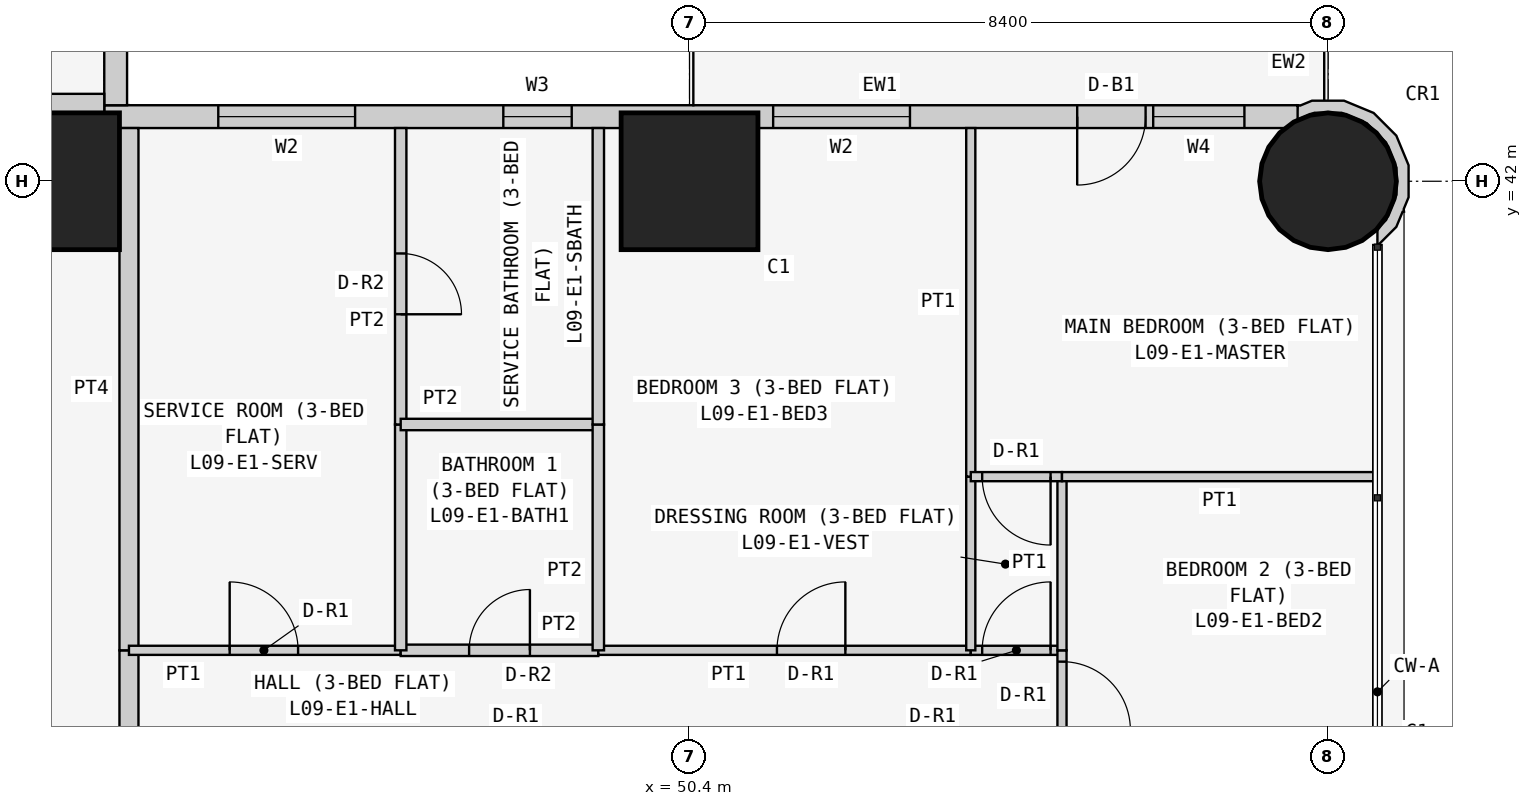
"""IFC4 building model, lengths in metres.
Left out: names, types, materials, properties, quantities, classifications, styles, units other than length and angle.
Written with IfcOpenShell. Run it as: python <this file> out.ifc"""

import sys

from ifc_helpers import new_model, si_unit, direction, frame, frame_2d, origin, origin_2d, place, context, subcontext, project, spatial, polyline, rectangle, circle, outline, extrude, element, fill, save


model = new_model("IFC4")
c1 = context("Model", 3, precision=1e-05, world=origin(), true_north=direction((0.0, 1.0)))
c2 = subcontext(c1, "Body", "Model", "MODEL_VIEW")
j1 = project(units=[si_unit("LENGTHUNIT", "METRE"), si_unit("PLANEANGLEUNIT", "RADIAN")], contexts=[c1])
p1 = place(None, origin())
s1 = spatial("IfcSite", under=j1, at=p1, CompositionType="ELEMENT")
p2 = place(p1, origin())
s2 = spatial("IfcBuilding", under=s1, at=p2, CompositionType="ELEMENT")
p3 = place(p2, frame((0.0, 0.0, 41.7)))
s3 = spatial("IfcBuildingStorey", under=s2, at=p3, CompositionType="ELEMENT", Elevation=41.7)
for number, where, z_axis, x_axis in (
    (1, (42.0, 42.0, 0.0), (0.0, 0.0, 1.0), (1.0, 0.0, 0.0)),
    (2, (50.4, 42.0, 0.0), (0.0, 0.0, 1.0), (1.0, 0.0, 0.0)),
):
    element("IfcColumn", number, at=place(p3, frame(where, z_axis=z_axis, x_axis=x_axis)), inside=s3, PredefinedType="COLUMN", context=c2, shape_type="SweptSolid", body=[
        extrude(rectangle(XDim=1.8, YDim=1.8, at=origin_2d()), origin(), (0.0, 0.0, 1.0), 3.6),
    ])
p4 = place(p3, frame((58.8, 42.0, 0.0), z_axis=(0.0, 0.0, 1.0), x_axis=(1.0, 0.0, 0.0)))
e3 = element("IfcColumn", 3, at=p4, inside=s3, PredefinedType="COLUMN", context=c2, shape_type="SweptSolid", body=[
    extrude(circle(Radius=0.9, at=origin_2d()), origin(), (0.0, 0.0, 1.0), 3.6),
])
p5 = place(p3, frame((58.4, 42.85, 0.0), z_axis=(0.0, 0.0, 1.0), x_axis=(-1.0, 0.0, 0.0)))
e4 = element("IfcWall", 4, at=p5, inside=s3, PredefinedType="SOLIDWALL", context=c2, shape_type="SweptSolid", body=[
    extrude(rectangle(XDim=15.7, YDim=0.3, at=frame_2d((7.85, 0.0))), origin(), (0.0, 0.0, 1.0), 3.45),
])
p6 = place(p5, frame((12.4, 0.0, 0.9)))
e5 = element("IfcOpeningElement", 5, at=p6, cuts=e4, PredefinedType="OPENING", context=c2, shape_type="SweptSolid", body=[
    extrude(rectangle(XDim=1.8, YDim=1.5, at=frame_2d((0.9, 0.75))), frame((0.0, 0.16, 0.0), z_axis=(0.0, -1.0, 0.0), x_axis=(1.0, 0.0, 0.0)), (0.0, 0.0, 1.0), 0.32),
])
p7 = place(p5, frame((9.55, 0.0, 1.5)))
e6 = element("IfcOpeningElement", 6, at=p7, cuts=e4, PredefinedType="OPENING", context=c2, shape_type="SweptSolid", body=[
    extrude(rectangle(XDim=0.9, YDim=0.7, at=frame_2d((0.45, 0.35))), frame((0.0, 0.16, 0.0), z_axis=(0.0, -1.0, 0.0), x_axis=(1.0, 0.0, 0.0)), (0.0, 0.0, 1.0), 0.32),
])
p8 = place(p5, frame((5.1, 0.0, 0.9)))
e7 = element("IfcOpeningElement", 7, at=p8, cuts=e4, PredefinedType="OPENING", context=c2, shape_type="SweptSolid", body=[
    extrude(rectangle(XDim=1.8, YDim=1.5, at=frame_2d((0.9, 0.75))), frame((0.0, 0.16, 0.0), z_axis=(0.0, -1.0, 0.0), x_axis=(1.0, 0.0, 0.0)), (0.0, 0.0, 1.0), 0.32),
])
p9 = place(p5, frame((2.0, 0.0, 0.0)))
e8 = element("IfcOpeningElement", 8, at=p9, cuts=e4, PredefinedType="OPENING", context=c2, shape_type="SweptSolid", body=[
    extrude(rectangle(XDim=0.9, YDim=2.4, at=frame_2d((0.45, 1.2))), frame((0.0, 0.16, 0.0), z_axis=(0.0, -1.0, 0.0), x_axis=(1.0, 0.0, 0.0)), (0.0, 0.0, 1.0), 0.32),
])
p10 = place(p5, frame((0.7, 0.0, 0.9)))
e9 = element("IfcOpeningElement", 9, at=p10, cuts=e4, PredefinedType="OPENING", context=c2, shape_type="SweptSolid", body=[
    extrude(rectangle(XDim=1.2, YDim=1.5, at=frame_2d((0.6, 0.75))), frame((0.0, 0.16, 0.0), z_axis=(0.0, -1.0, 0.0), x_axis=(1.0, 0.0, 0.0)), (0.0, 0.0, 1.0), 0.32),
])
p11 = place(p3, frame((42.85, 43.0, 0.0), z_axis=(0.0, 0.0, 1.0), x_axis=(0.0, 1.0, 0.0)))
e10 = element("IfcWall", 10, at=p11, inside=s3, PredefinedType="SOLIDWALL", context=c2, shape_type="SweptSolid", body=[
    extrude(rectangle(XDim=15.4, YDim=0.3, at=frame_2d((7.7, 0.0))), origin(), (0.0, 0.0, 1.0), 3.45),
])
p12 = place(p11, frame((1.2, 0.0, 0.9)))
e11 = element("IfcOpeningElement", 11, at=p12, cuts=e10, PredefinedType="OPENING", context=c2, shape_type="SweptSolid", body=[
    extrude(rectangle(XDim=1.8, YDim=1.5, at=frame_2d((0.9, 0.75))), frame((0.0, 0.16, 0.0), z_axis=(0.0, -1.0, 0.0), x_axis=(1.0, 0.0, 0.0)), (0.0, 0.0, 1.0), 0.32),
])
p13 = place(p11, frame((4.95, 0.0, 1.5)))
e12 = element("IfcOpeningElement", 12, at=p13, cuts=e10, PredefinedType="OPENING", context=c2, shape_type="SweptSolid", body=[
    extrude(rectangle(XDim=0.9, YDim=0.7, at=frame_2d((0.45, 0.35))), frame((0.0, 0.16, 0.0), z_axis=(0.0, -1.0, 0.0), x_axis=(1.0, 0.0, 0.0)), (0.0, 0.0, 1.0), 0.32),
])
p14 = place(p11, frame((8.5, 0.0, 0.9)))
e13 = element("IfcOpeningElement", 13, at=p14, cuts=e10, PredefinedType="OPENING", context=c2, shape_type="SweptSolid", body=[
    extrude(rectangle(XDim=1.8, YDim=1.5, at=frame_2d((0.9, 0.75))), frame((0.0, 0.16, 0.0), z_axis=(0.0, -1.0, 0.0), x_axis=(1.0, 0.0, 0.0)), (0.0, 0.0, 1.0), 0.32),
])
p15 = place(p11, frame((12.5, 0.0, 0.0)))
e14 = element("IfcOpeningElement", 14, at=p15, cuts=e10, PredefinedType="OPENING", context=c2, shape_type="SweptSolid", body=[
    extrude(rectangle(XDim=0.9, YDim=2.4, at=frame_2d((0.45, 1.2))), frame((0.0, 0.16, 0.0), z_axis=(0.0, -1.0, 0.0), x_axis=(1.0, 0.0, 0.0)), (0.0, 0.0, 1.0), 0.32),
])
p16 = place(p11, frame((13.5, 0.0, 0.9)))
e15 = element("IfcOpeningElement", 15, at=p16, cuts=e10, PredefinedType="OPENING", context=c2, shape_type="SweptSolid", body=[
    extrude(rectangle(XDim=1.2, YDim=1.5, at=frame_2d((0.6, 0.75))), frame((0.0, 0.16, 0.0), z_axis=(0.0, -1.0, 0.0), x_axis=(1.0, 0.0, 0.0)), (0.0, 0.0, 1.0), 0.32),
])
p17 = place(p3, frame((59.411, 41.233, 0.0), z_axis=(0.0, 0.0, 1.0), x_axis=(0.926129809145, 0.377204953059, 0.0)))
e16 = element("IfcWall", 16, at=p17, inside=s3, PredefinedType="SOLIDWALL", context=c2, shape_type="SweptSolid", body=[
    extrude(outline(polyline([(0.626, 0.345), (0.785, 0.736), (0.782, 1.157), (0.619, 1.546), (0.319, 1.843), (-0.072, 2.002), (-0.24, 2.001), (-0.27, 2.017), (-0.37, 1.841), (-0.102, 1.842), (0.23, 1.707), (0.485, 1.455), (0.624, 1.125), (0.626, 0.766), (0.491, 0.434), (0.238, 0.179), (0.09, 0.117), (0.011, -0.078), (0.024, -0.083), (0.329, 0.045), (0.48, 0.198), (0.499, 0.193), (0.508, 0.225), (0.626, 0.345)])), origin(), (0.0, 0.0, 1.0), 3.45),
])
p18 = place(p3, frame((35.829, 43.025, 0.0), z_axis=(0.0, 0.0, 1.0), x_axis=(1.0, 0.0, 0.0)))
e17 = element("IfcWall", 17, at=p18, inside=s3, PredefinedType="PARTITIONING", context=c2, shape_type="SweptSolid", body=[
    extrude(rectangle(XDim=6.871, YDim=0.25, at=frame_2d((3.436, 0.0))), origin(), (0.0, 0.0, 1.0), 3.45),
])
p19 = place(p3, frame((43.025, 35.829, 0.0), z_axis=(0.0, 0.0, 1.0), x_axis=(0.0, -1.0, 0.0)))
e18 = element("IfcWall", 18, at=p19, inside=s3, PredefinedType="PARTITIONING", context=c2, shape_type="SweptSolid", body=[
    extrude(rectangle(XDim=1.2, YDim=0.25, at=frame_2d((0.6, 0.0))), origin(), (0.0, 0.0, 1.0), 3.45),
])
p20 = place(p3, frame((43.025, 42.7, 0.0), z_axis=(0.0, 0.0, 1.0), x_axis=(0.0, -1.0, 0.0)))
e19 = element("IfcWall", 19, at=p20, inside=s3, PredefinedType="PARTITIONING", context=c2, shape_type="SweptSolid", body=[
    extrude(rectangle(XDim=6.871, YDim=0.25, at=frame_2d((3.436, 0.0))), origin(), (0.0, 0.0, 1.0), 3.45),
])
p21 = place(p3, frame((46.6, 35.829, 0.0), z_axis=(0.0, 0.0, 1.0), x_axis=(-1.0, 0.0, 0.0)))
e20 = element("IfcWall", 20, at=p21, inside=s3, PredefinedType="PARTITIONING", context=c2, shape_type="SweptSolid", body=[
    extrude(rectangle(XDim=3.575, YDim=0.12, at=frame_2d((1.788, 0.0))), origin(), (0.0, 0.0, 1.0), 3.45),
])
p22 = place(p21, frame((1.35, 0.0, 0.0)))
e21 = element("IfcOpeningElement", 21, at=p22, cuts=e20, PredefinedType="OPENING", context=c2, shape_type="SweptSolid", body=[
    extrude(rectangle(XDim=0.9, YDim=2.1, at=frame_2d((0.45, 1.05))), frame((0.0, 0.07, 0.0), z_axis=(0.0, -1.0, 0.0), x_axis=(1.0, 0.0, 0.0)), (0.0, 0.0, 1.0), 0.14),
])
p23 = place(p3, frame((49.2, 35.829, 0.0), z_axis=(0.0, 0.0, 1.0), x_axis=(-1.0, 0.0, 0.0)))
e22 = element("IfcWall", 22, at=p23, inside=s3, PredefinedType="PARTITIONING", context=c2, shape_type="SweptSolid", body=[
    extrude(rectangle(XDim=2.6, YDim=0.15, at=frame_2d((1.3, 0.0))), origin(), (0.0, 0.0, 1.0), 3.45),
])
p24 = place(p23, frame((0.9, 0.0, 0.0)))
e23 = element("IfcOpeningElement", 23, at=p24, cuts=e22, PredefinedType="OPENING", context=c2, shape_type="SweptSolid", body=[
    extrude(rectangle(XDim=0.8, YDim=2.1, at=frame_2d((0.4, 1.05))), frame((0.0, 0.085, 0.0), z_axis=(0.0, -1.0, 0.0), x_axis=(1.0, 0.0, 0.0)), (0.0, 0.0, 1.0), 0.17),
])
p25 = place(p3, frame((54.1, 35.829, 0.0), z_axis=(0.0, 0.0, 1.0), x_axis=(-1.0, 0.0, 0.0)))
e24 = element("IfcWall", 24, at=p25, inside=s3, PredefinedType="PARTITIONING", context=c2, shape_type="SweptSolid", body=[
    extrude(rectangle(XDim=4.9, YDim=0.12, at=frame_2d((2.45, 0.0))), origin(), (0.0, 0.0, 1.0), 3.45),
])
p26 = place(p25, frame((1.65, 0.0, 0.0)))
e25 = element("IfcOpeningElement", 25, at=p26, cuts=e24, PredefinedType="OPENING", context=c2, shape_type="SweptSolid", body=[
    extrude(rectangle(XDim=0.9, YDim=2.1, at=frame_2d((0.45, 1.05))), frame((0.0, 0.07, 0.0), z_axis=(0.0, -1.0, 0.0), x_axis=(1.0, 0.0, 0.0)), (0.0, 0.0, 1.0), 0.14),
])
p27 = place(p3, frame((55.3, 35.829, 0.0), z_axis=(0.0, 0.0, 1.0), x_axis=(-1.0, 0.0, 0.0)))
e26 = element("IfcWall", 26, at=p27, inside=s3, PredefinedType="PARTITIONING", context=c2, shape_type="SweptSolid", body=[
    extrude(rectangle(XDim=1.2, YDim=0.12, at=frame_2d((0.6, 0.0))), origin(), (0.0, 0.0, 1.0), 3.45),
])
p28 = place(p27, frame((0.15, 0.0, 0.0)))
e27 = element("IfcOpeningElement", 27, at=p28, cuts=e26, PredefinedType="OPENING", context=c2, shape_type="SweptSolid", body=[
    extrude(rectangle(XDim=0.9, YDim=2.1, at=frame_2d((0.45, 1.05))), frame((0.0, 0.07, 0.0), z_axis=(0.0, -1.0, 0.0), x_axis=(1.0, 0.0, 0.0)), (0.0, 0.0, 1.0), 0.14),
])
p29 = place(p3, frame((55.3, 34.629, 0.0), z_axis=(0.0, 0.0, 1.0), x_axis=(0.0, 1.0, 0.0)))
e28 = element("IfcWall", 28, at=p29, inside=s3, PredefinedType="PARTITIONING", context=c2, shape_type="SweptSolid", body=[
    extrude(rectangle(XDim=1.2, YDim=0.12, at=frame_2d((0.6, 0.0))), origin(), (0.0, 0.0, 1.0), 3.45),
])
p30 = place(p29, frame((0.151, 0.0, 0.0)))
e29 = element("IfcOpeningElement", 29, at=p30, cuts=e28, PredefinedType="OPENING", context=c2, shape_type="SweptSolid", body=[
    extrude(rectangle(XDim=0.9, YDim=2.1, at=frame_2d((0.45, 1.05))), frame((0.0, 0.07, 0.0), z_axis=(0.0, -1.0, 0.0), x_axis=(1.0, 0.0, 0.0)), (0.0, 0.0, 1.0), 0.14),
])
p31 = place(p3, frame((46.6, 35.829, 0.0), z_axis=(0.0, 0.0, 1.0), x_axis=(0.0, 1.0, 0.0)))
e30 = element("IfcWall", 30, at=p31, inside=s3, PredefinedType="PARTITIONING", context=c2, shape_type="SweptSolid", body=[
    extrude(rectangle(XDim=2.971, YDim=0.15, at=frame_2d((1.485, 0.0))), origin(), (0.0, 0.0, 1.0), 3.45),
])
p32 = place(p3, frame((46.6, 38.8, 0.0), z_axis=(0.0, 0.0, 1.0), x_axis=(0.0, 1.0, 0.0)))
e31 = element("IfcWall", 31, at=p32, inside=s3, PredefinedType="PARTITIONING", context=c2, shape_type="SweptSolid", body=[
    extrude(rectangle(XDim=3.9, YDim=0.15, at=frame_2d((1.95, 0.0))), origin(), (0.0, 0.0, 1.0), 3.45),
])
p33 = place(p32, frame((1.45, 0.0, 0.0)))
e32 = element("IfcOpeningElement", 32, at=p33, cuts=e31, PredefinedType="OPENING", context=c2, shape_type="SweptSolid", body=[
    extrude(rectangle(XDim=0.8, YDim=2.1, at=frame_2d((0.4, 1.05))), frame((0.0, 0.085, 0.0), z_axis=(0.0, -1.0, 0.0), x_axis=(1.0, 0.0, 0.0)), (0.0, 0.0, 1.0), 0.17),
])
p34 = place(p3, frame((49.2, 38.8, 0.0), z_axis=(0.0, 0.0, 1.0), x_axis=(-1.0, 0.0, 0.0)))
e33 = element("IfcWall", 33, at=p34, inside=s3, PredefinedType="PARTITIONING", context=c2, shape_type="SweptSolid", body=[
    extrude(rectangle(XDim=2.6, YDim=0.15, at=frame_2d((1.3, 0.0))), origin(), (0.0, 0.0, 1.0), 3.45),
])
p35 = place(p3, frame((49.2, 35.829, 0.0), z_axis=(0.0, 0.0, 1.0), x_axis=(0.0, 1.0, 0.0)))
e34 = element("IfcWall", 34, at=p35, inside=s3, PredefinedType="PARTITIONING", context=c2, shape_type="SweptSolid", body=[
    extrude(rectangle(XDim=2.971, YDim=0.15, at=frame_2d((1.485, 0.0))), origin(), (0.0, 0.0, 1.0), 3.45),
])
p36 = place(p3, frame((49.2, 38.8, 0.0), z_axis=(0.0, 0.0, 1.0), x_axis=(0.0, 1.0, 0.0)))
e35 = element("IfcWall", 35, at=p36, inside=s3, PredefinedType="PARTITIONING", context=c2, shape_type="SweptSolid", body=[
    extrude(rectangle(XDim=3.9, YDim=0.15, at=frame_2d((1.95, 0.0))), origin(), (0.0, 0.0, 1.0), 3.45),
])
p37 = place(p3, frame((54.1, 35.829, 0.0), z_axis=(0.0, 0.0, 1.0), x_axis=(0.0, 1.0, 0.0)))
e36 = element("IfcWall", 36, at=p37, inside=s3, PredefinedType="PARTITIONING", context=c2, shape_type="SweptSolid", body=[
    extrude(rectangle(XDim=2.285, YDim=0.12, at=frame_2d((1.143, 0.0))), origin(), (0.0, 0.0, 1.0), 3.45),
])
p38 = place(p3, frame((54.1, 38.114, 0.0), z_axis=(0.0, 0.0, 1.0), x_axis=(0.0, 1.0, 0.0)))
e37 = element("IfcWall", 37, at=p38, inside=s3, PredefinedType="PARTITIONING", context=c2, shape_type="SweptSolid", body=[
    extrude(rectangle(XDim=4.586, YDim=0.12, at=frame_2d((2.293, 0.0))), origin(), (0.0, 0.0, 1.0), 3.45),
])
p39 = place(p3, frame((55.3, 35.829, 0.0), z_axis=(0.0, 0.0, 1.0), x_axis=(0.0, 1.0, 0.0)))
e38 = element("IfcWall", 38, at=p39, inside=s3, PredefinedType="PARTITIONING", context=c2, shape_type="SweptSolid", body=[
    extrude(rectangle(XDim=2.285, YDim=0.12, at=frame_2d((1.143, 0.0))), origin(), (0.0, 0.0, 1.0), 3.45),
])
p40 = place(p3, frame((55.3, 38.114, 0.0), z_axis=(0.0, 0.0, 1.0), x_axis=(-1.0, 0.0, 0.0)))
e39 = element("IfcWall", 39, at=p40, inside=s3, PredefinedType="PARTITIONING", context=c2, shape_type="SweptSolid", body=[
    extrude(rectangle(XDim=1.2, YDim=0.12, at=frame_2d((0.6, 0.0))), origin(), (0.0, 0.0, 1.0), 3.45),
])
p41 = place(p40, frame((0.15, 0.0, 0.0)))
e40 = element("IfcOpeningElement", 40, at=p41, cuts=e39, PredefinedType="OPENING", context=c2, shape_type="SweptSolid", body=[
    extrude(rectangle(XDim=0.9, YDim=2.1, at=frame_2d((0.45, 1.05))), frame((0.0, 0.07, 0.0), z_axis=(0.0, -1.0, 0.0), x_axis=(1.0, 0.0, 0.0)), (0.0, 0.0, 1.0), 0.14),
])
p42 = place(p3, frame((59.45, 38.114, 0.0), z_axis=(0.0, 0.0, 1.0), x_axis=(-1.0, 0.0, 0.0)))
e41 = element("IfcWall", 41, at=p42, inside=s3, PredefinedType="PARTITIONING", context=c2, shape_type="SweptSolid", body=[
    extrude(rectangle(XDim=4.15, YDim=0.12, at=frame_2d((2.075, 0.0))), origin(), (0.0, 0.0, 1.0), 3.45),
])
p43 = place(p6, origin())
e42 = element("IfcWindow", 42, at=p43, inside=s3, PartitioningType="SINGLE_PANEL", PredefinedType="WINDOW", context=c2, shape_type="SweptSolid", body=[
    extrude(rectangle(XDim=1.8, YDim=1.5, at=frame_2d((0.9, 0.75))), frame((0.0, 0.03, 0.0), z_axis=(0.0, -1.0, 0.0), x_axis=(1.0, 0.0, 0.0)), (0.0, 0.0, 1.0), 0.06),
])
fill(e5, e42)
p44 = place(p7, origin())
e43 = element("IfcWindow", 43, at=p44, inside=s3, PartitioningType="SINGLE_PANEL", PredefinedType="WINDOW", context=c2, shape_type="SweptSolid", body=[
    extrude(rectangle(XDim=0.9, YDim=0.7, at=frame_2d((0.45, 0.35))), frame((0.0, 0.03, 0.0), z_axis=(0.0, -1.0, 0.0), x_axis=(1.0, 0.0, 0.0)), (0.0, 0.0, 1.0), 0.06),
])
fill(e6, e43)
p45 = place(p8, origin())
e44 = element("IfcWindow", 44, at=p45, inside=s3, PartitioningType="SINGLE_PANEL", PredefinedType="WINDOW", context=c2, shape_type="SweptSolid", body=[
    extrude(rectangle(XDim=1.8, YDim=1.5, at=frame_2d((0.9, 0.75))), frame((0.0, 0.03, 0.0), z_axis=(0.0, -1.0, 0.0), x_axis=(1.0, 0.0, 0.0)), (0.0, 0.0, 1.0), 0.06),
])
fill(e7, e44)
p46 = place(p9, origin())
e45 = element("IfcDoor", 45, at=p46, inside=s3, OperationType="SINGLE_SWING_RIGHT", PredefinedType="DOOR", context=c2, shape_type="SweptSolid", body=[
    extrude(rectangle(XDim=0.9, YDim=2.4, at=frame_2d((0.45, 1.2))), frame((0.0, 0.025, 0.0), z_axis=(0.0, -1.0, 0.0), x_axis=(1.0, 0.0, 0.0)), (0.0, 0.0, 1.0), 0.05),
])
fill(e8, e45)
p47 = place(p10, origin())
e46 = element("IfcWindow", 46, at=p47, inside=s3, PartitioningType="SINGLE_PANEL", PredefinedType="WINDOW", context=c2, shape_type="SweptSolid", body=[
    extrude(rectangle(XDim=1.2, YDim=1.5, at=frame_2d((0.6, 0.75))), frame((0.0, 0.03, 0.0), z_axis=(0.0, -1.0, 0.0), x_axis=(1.0, 0.0, 0.0)), (0.0, 0.0, 1.0), 0.06),
])
fill(e9, e46)
p48 = place(p22, frame((0.9, 0.0, 0.0), z_axis=(0.0, 0.0, 1.0), x_axis=(-1.0, 0.0, 0.0)))
e47 = element("IfcDoor", 47, at=p48, inside=s3, OperationType="SINGLE_SWING_LEFT", PredefinedType="DOOR", context=c2, shape_type="SweptSolid", body=[
    extrude(rectangle(XDim=0.9, YDim=2.1, at=frame_2d((0.45, 1.05))), frame((0.0, 0.025, 0.0), z_axis=(0.0, -1.0, 0.0), x_axis=(1.0, 0.0, 0.0)), (0.0, 0.0, 1.0), 0.05),
])
fill(e21, e47)
p49 = place(p33, frame((0.8, 0.0, 0.0), z_axis=(0.0, 0.0, 1.0), x_axis=(-1.0, 0.0, 0.0)))
e48 = element("IfcDoor", 48, at=p49, inside=s3, OperationType="SINGLE_SWING_RIGHT", PredefinedType="DOOR", context=c2, shape_type="SweptSolid", body=[
    extrude(rectangle(XDim=0.8, YDim=2.1, at=frame_2d((0.4, 1.05))), frame((0.0, 0.025, 0.0), z_axis=(0.0, -1.0, 0.0), x_axis=(1.0, 0.0, 0.0)), (0.0, 0.0, 1.0), 0.05),
])
fill(e32, e48)
p50 = place(p24, frame((0.8, 0.0, 0.0), z_axis=(0.0, 0.0, 1.0), x_axis=(-1.0, 0.0, 0.0)))
e49 = element("IfcDoor", 49, at=p50, inside=s3, OperationType="SINGLE_SWING_RIGHT", PredefinedType="DOOR", context=c2, shape_type="SweptSolid", body=[
    extrude(rectangle(XDim=0.8, YDim=2.1, at=frame_2d((0.4, 1.05))), frame((0.0, 0.025, 0.0), z_axis=(0.0, -1.0, 0.0), x_axis=(1.0, 0.0, 0.0)), (0.0, 0.0, 1.0), 0.05),
])
fill(e23, e49)
p51 = place(p26, frame((0.9, 0.0, 0.0), z_axis=(0.0, 0.0, 1.0), x_axis=(-1.0, 0.0, 0.0)))
e50 = element("IfcDoor", 50, at=p51, inside=s3, OperationType="SINGLE_SWING_RIGHT", PredefinedType="DOOR", context=c2, shape_type="SweptSolid", body=[
    extrude(rectangle(XDim=0.9, YDim=2.1, at=frame_2d((0.45, 1.05))), frame((0.0, 0.025, 0.0), z_axis=(0.0, -1.0, 0.0), x_axis=(1.0, 0.0, 0.0)), (0.0, 0.0, 1.0), 0.05),
])
fill(e25, e50)
p52 = place(p28, frame((0.9, 0.0, 0.0), z_axis=(0.0, 0.0, 1.0), x_axis=(-1.0, 0.0, 0.0)))
e51 = element("IfcDoor", 51, at=p52, inside=s3, OperationType="SINGLE_SWING_RIGHT", PredefinedType="DOOR", context=c2, shape_type="SweptSolid", body=[
    extrude(rectangle(XDim=0.9, YDim=2.1, at=frame_2d((0.45, 1.05))), frame((0.0, 0.025, 0.0), z_axis=(0.0, -1.0, 0.0), x_axis=(1.0, 0.0, 0.0)), (0.0, 0.0, 1.0), 0.05),
])
fill(e27, e51)
p53 = place(p41, origin())
e52 = element("IfcDoor", 52, at=p53, inside=s3, OperationType="SINGLE_SWING_LEFT", PredefinedType="DOOR", context=c2, shape_type="SweptSolid", body=[
    extrude(rectangle(XDim=0.9, YDim=2.1, at=frame_2d((0.45, 1.05))), frame((0.0, 0.025, 0.0), z_axis=(0.0, -1.0, 0.0), x_axis=(1.0, 0.0, 0.0)), (0.0, 0.0, 1.0), 0.05),
])
fill(e40, e52)
p54 = place(p30, frame((0.9, 0.0, 0.0), z_axis=(0.0, 0.0, 1.0), x_axis=(-1.0, 0.0, 0.0)))
e53 = element("IfcDoor", 53, at=p54, inside=s3, OperationType="SINGLE_SWING_RIGHT", PredefinedType="DOOR", context=c2, shape_type="SweptSolid", body=[
    extrude(rectangle(XDim=0.9, YDim=2.1, at=frame_2d((0.45, 1.05))), frame((0.0, 0.025, 0.0), z_axis=(0.0, -1.0, 0.0), x_axis=(1.0, 0.0, 0.0)), (0.0, 0.0, 1.0), 0.05),
])
fill(e29, e53)
save(model, sys.argv[1])
